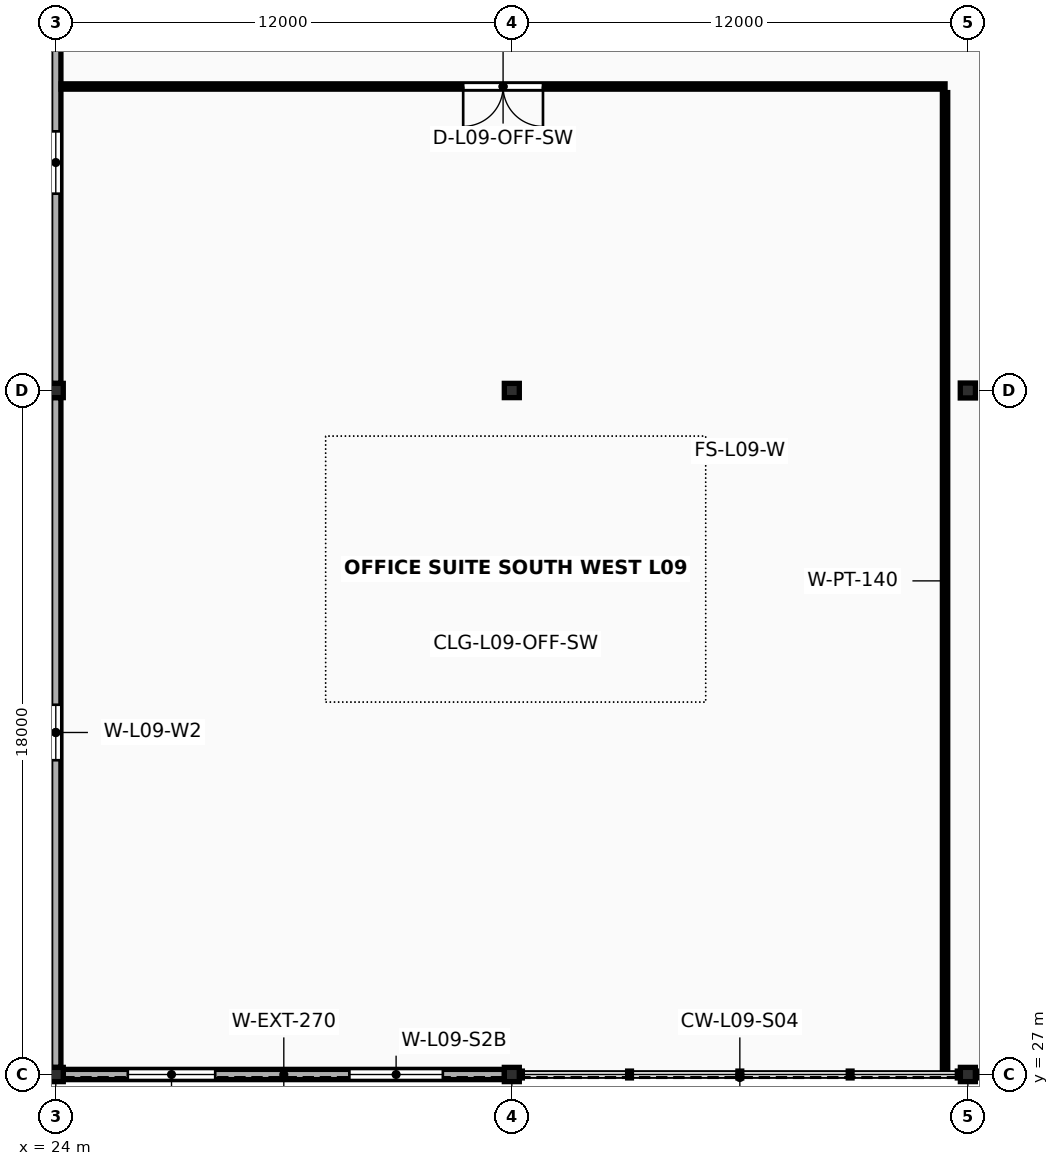
"""IFC4 building model, lengths in metres.
Left out: names, types, materials, properties, quantities, classifications, styles, units other than length and angle.
Written with IfcOpenShell. Run it as: python <this file> out.ifc"""

import sys

from ifc_helpers import new_model, si_unit, direction, frame, frame_2d, origin, origin_2d, place, context, subcontext, project, spatial, rectangle, i_section, extrude, element, fill, save


model = new_model("IFC4")
c1 = context("Model", 3, precision=1e-05, world=origin(), true_north=direction((0.0, 1.0)))
c2 = subcontext(c1, "Body", "Model", "MODEL_VIEW")
j1 = project(units=[si_unit("LENGTHUNIT", "METRE"), si_unit("PLANEANGLEUNIT", "RADIAN")], contexts=[c1])
p1 = place(None, origin())
s1 = spatial("IfcSite", under=j1, at=p1, CompositionType="ELEMENT")
p2 = place(p1, origin())
s2 = spatial("IfcBuilding", under=s1, at=p2, CompositionType="ELEMENT")
p3 = place(p2, frame((0.0, 0.0, 37.6)))
s3 = spatial("IfcBuildingStorey", under=s2, at=p3, CompositionType="ELEMENT", Elevation=37.6)
for number, where, z_axis, x_axis in (
    (1, (24.0, 27.0, 0.0), (0.0, 0.0, 1.0), (1.0, 0.0, 0.0)),
    (2, (24.0, 45.0, 0.0), (0.0, 0.0, 1.0), (1.0, 0.0, 0.0)),
    (3, (36.0, 27.0, 0.0), (0.0, 0.0, 1.0), (1.0, 0.0, 0.0)),
    (4, (36.0, 45.0, 0.0), (0.0, 0.0, 1.0), (1.0, 0.0, 0.0)),
    (5, (48.0, 27.0, 0.0), (0.0, 0.0, 1.0), (1.0, 0.0, 0.0)),
):
    element("IfcColumn", number, at=place(p3, frame(where, z_axis=z_axis, x_axis=x_axis)), inside=s3, PredefinedType="COLUMN", context=c2, shape_type="SweptSolid", body=[
        extrude(i_section(OverallWidth=0.394, OverallDepth=0.375, WebThickness=0.017, FlangeThickness=0.028, FilletRadius=0.018, at=origin_2d()), origin(), (0.0, 0.0, 1.0), 4.0),
    ])
p4 = place(p3, frame((48.0, 45.0, 0.0), z_axis=(0.0, 0.0, 1.0), x_axis=(1.0, 0.0, 0.0)))
e6 = element("IfcColumn", 6, at=p4, inside=s3, PredefinedType="COLUMN", context=c2, shape_type="SweptSolid", body=[
    extrude(i_section(OverallWidth=0.399, OverallDepth=0.393, WebThickness=0.023, FlangeThickness=0.037, FilletRadius=0.018, at=origin_2d()), origin(), (0.0, 0.0, 1.0), 4.0),
])
p5 = place(p3, frame((24.195, 27.0, 0.0), z_axis=(0.0, 0.0, 1.0), x_axis=(1.0, 0.0, 0.0)))
e7 = element("IfcWall", 7, at=p5, inside=s3, PredefinedType="SOLIDWALL", context=c2, shape_type="SweptSolid", body=[
    extrude(rectangle(XDim=11.61, YDim=0.27, at=frame_2d((5.805, 0.0))), origin(), (0.0, 0.0, 1.0), 3.291),
])
p6 = place(p5, frame((1.7, 0.0, 0.78)))
e8 = element("IfcOpeningElement", 8, at=p6, cuts=e7, PredefinedType="OPENING", context=c2, shape_type="SweptSolid", body=[
    extrude(rectangle(XDim=2.3, YDim=1.58, at=frame_2d((1.15, 0.79))), frame((0.0, 0.15, 0.0), z_axis=(0.0, -1.0, 0.0), x_axis=(1.0, 0.0, 0.0)), (0.0, 0.0, 1.0), 0.3),
])
p7 = place(p5, frame((7.53, 0.0, 0.78)))
e9 = element("IfcOpeningElement", 9, at=p7, cuts=e7, PredefinedType="OPENING", context=c2, shape_type="SweptSolid", body=[
    extrude(rectangle(XDim=2.46, YDim=1.58, at=frame_2d((1.23, 0.79))), frame((0.0, 0.15, 0.0), z_axis=(0.0, -1.0, 0.0), x_axis=(1.0, 0.0, 0.0)), (0.0, 0.0, 1.0), 0.3),
])
p8 = place(p3, frame((24.0, 27.186, 0.0), z_axis=(0.0, 0.0, 1.0), x_axis=(0.0, 1.0, 0.0)))
e10 = element("IfcWall", 10, at=p8, inside=s3, PredefinedType="SOLIDWALL", context=c2, shape_type="SweptSolid", body=[
    extrude(rectangle(XDim=17.629, YDim=0.27, at=frame_2d((8.814, 0.0))), origin(), (0.0, 0.0, 1.0), 3.291),
])
p9 = place(p8, frame((8.085, 0.0, 0.78)))
e11 = element("IfcOpeningElement", 11, at=p9, cuts=e10, PredefinedType="OPENING", context=c2, shape_type="SweptSolid", body=[
    extrude(rectangle(XDim=1.46, YDim=1.74, at=frame_2d((0.73, 0.87))), frame((0.0, 0.15, 0.0), z_axis=(0.0, -1.0, 0.0), x_axis=(1.0, 0.0, 0.0)), (0.0, 0.0, 1.0), 0.3),
])
p10 = place(p3, frame((24.0, 45.186, 0.0), z_axis=(0.0, 0.0, 1.0), x_axis=(0.0, 1.0, 0.0)))
e12 = element("IfcWall", 12, at=p10, inside=s3, PredefinedType="SOLIDWALL", context=c2, shape_type="SweptSolid", body=[
    extrude(rectangle(XDim=11.629, YDim=0.27, at=frame_2d((5.814, 0.0))), origin(), (0.0, 0.0, 1.0), 3.291),
])
p11 = place(p10, frame((4.994, 0.0, 0.78)))
e13 = element("IfcOpeningElement", 13, at=p11, cuts=e12, PredefinedType="OPENING", context=c2, shape_type="SweptSolid", body=[
    extrude(rectangle(XDim=1.64, YDim=1.74, at=frame_2d((0.82, 0.87))), frame((0.0, 0.15, 0.0), z_axis=(0.0, -1.0, 0.0), x_axis=(1.0, 0.0, 0.0)), (0.0, 0.0, 1.0), 0.3),
])
p12 = place(p3, frame((24.14, 53.0, 0.0), z_axis=(0.0, 0.0, 1.0), x_axis=(1.0, 0.0, 0.0)))
e14 = element("IfcWall", 14, at=p12, inside=s3, PredefinedType="PARTITIONING", context=c2, shape_type="SweptSolid", body=[
    extrude(rectangle(XDim=23.26, YDim=0.14, at=frame_2d((11.63, 0.0))), origin(), (0.0, 0.0, 1.0), 2.88),
])
p13 = place(p12, frame((10.58, 0.0, 0.0)))
e15 = element("IfcOpeningElement", 15, at=p13, cuts=e14, PredefinedType="OPENING", context=c2, shape_type="SweptSolid", body=[
    extrude(rectangle(XDim=2.1, YDim=2.47, at=frame_2d((1.05, 1.235))), frame((0.0, 0.085, 0.0), z_axis=(0.0, -1.0, 0.0), x_axis=(1.0, 0.0, 0.0)), (0.0, 0.0, 1.0), 0.17),
])
p14 = place(p3, frame((47.4, 27.14, 0.0), z_axis=(0.0, 0.0, 1.0), x_axis=(0.0, 1.0, 0.0)))
e16 = element("IfcWall", 16, at=p14, inside=s3, PredefinedType="PARTITIONING", context=c2, shape_type="SweptSolid", body=[
    extrude(rectangle(XDim=25.7, YDim=0.14, at=frame_2d((12.85, 0.0))), origin(), (0.0, 0.0, 1.0), 2.88),
])
p15 = place(p6, origin())
e17 = element("IfcWindow", 17, at=p15, inside=s3, PartitioningType="DOUBLE_PANEL_VERTICAL", PredefinedType="WINDOW", context=c2, shape_type="SweptSolid", body=[
    extrude(rectangle(XDim=2.3, YDim=1.58, at=frame_2d((1.15, 0.79))), frame((0.0, 0.03, 0.0), z_axis=(0.0, -1.0, 0.0), x_axis=(1.0, 0.0, 0.0)), (0.0, 0.0, 1.0), 0.06),
])
fill(e8, e17)
p16 = place(p7, origin())
e18 = element("IfcWindow", 18, at=p16, inside=s3, PartitioningType="DOUBLE_PANEL_VERTICAL", PredefinedType="WINDOW", context=c2, shape_type="SweptSolid", body=[
    extrude(rectangle(XDim=2.46, YDim=1.58, at=frame_2d((1.23, 0.79))), frame((0.0, 0.03, 0.0), z_axis=(0.0, -1.0, 0.0), x_axis=(1.0, 0.0, 0.0)), (0.0, 0.0, 1.0), 0.06),
])
fill(e9, e18)
p17 = place(p9, origin())
e19 = element("IfcWindow", 19, at=p17, inside=s3, PartitioningType="SINGLE_PANEL", PredefinedType="WINDOW", context=c2, shape_type="SweptSolid", body=[
    extrude(rectangle(XDim=1.46, YDim=1.74, at=frame_2d((0.73, 0.87))), frame((0.0, 0.03, 0.0), z_axis=(0.0, -1.0, 0.0), x_axis=(1.0, 0.0, 0.0)), (0.0, 0.0, 1.0), 0.06),
])
fill(e11, e19)
p18 = place(p11, origin())
e20 = element("IfcWindow", 20, at=p18, inside=s3, PartitioningType="SINGLE_PANEL", PredefinedType="WINDOW", context=c2, shape_type="SweptSolid", body=[
    extrude(rectangle(XDim=1.64, YDim=1.74, at=frame_2d((0.82, 0.87))), frame((0.0, 0.03, 0.0), z_axis=(0.0, -1.0, 0.0), x_axis=(1.0, 0.0, 0.0)), (0.0, 0.0, 1.0), 0.06),
])
fill(e13, e20)
p19 = place(p13, origin())
e21 = element("IfcDoor", 21, at=p19, inside=s3, OperationType="DOUBLE_DOOR_SINGLE_SWING", PredefinedType="DOOR", context=c2, shape_type="SweptSolid", body=[
    extrude(rectangle(XDim=2.1, YDim=2.47, at=frame_2d((1.05, 1.235))), frame((0.0, 0.025, 0.0), z_axis=(0.0, -1.0, 0.0), x_axis=(1.0, 0.0, 0.0)), (0.0, 0.0, 1.0), 0.05),
])
fill(e15, e21)
save(model, sys.argv[1])
